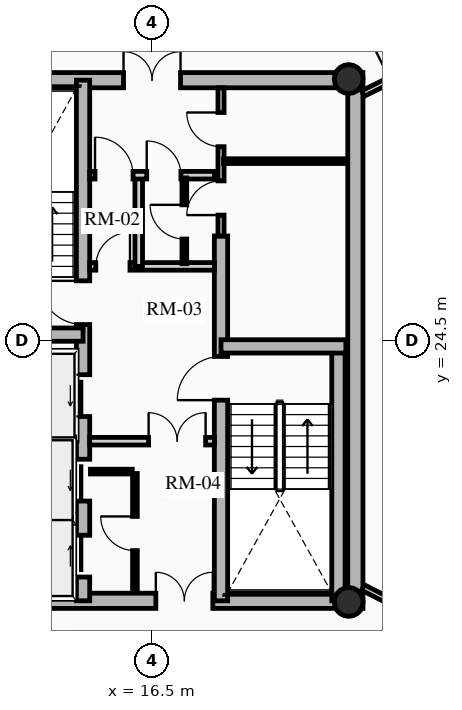
"""IFC4 building model, lengths in metres.
Left out: names, types, materials, properties, quantities, classifications, styles, units other than length and angle.
Written with IfcOpenShell. Run it as: python <this file> out.ifc"""

import sys

from ifc_helpers import new_model, si_unit, direction, frame, frame_2d, origin, origin_2d, place, context, subcontext, project, spatial, rectangle, hollow_circle, extrude, source, transform, mapped, element, fill, save


model = new_model("IFC4")
c1 = context("Model", 3, precision=1e-05, world=origin(), true_north=direction((0.0, 1.0)))
c2 = subcontext(c1, "Body", "Model", "MODEL_VIEW")
j1 = project(units=[si_unit("LENGTHUNIT", "METRE"), si_unit("PLANEANGLEUNIT", "RADIAN")], contexts=[c1])
p1 = place(None, origin())
s1 = spatial("IfcSite", under=j1, at=p1, CompositionType="ELEMENT")
p2 = place(p1, origin())
s2 = spatial("IfcBuilding", under=s1, at=p2, CompositionType="ELEMENT")
p3 = place(p2, frame((0.0, 0.0, 183.61)))
s3 = spatial("IfcBuildingStorey", under=s2, at=p3, CompositionType="ELEMENT", Elevation=183.61)
p4 = place(p3, frame((21.85, 17.45, 0.0), z_axis=(0.0, 0.0, 1.0), x_axis=(0.0, 1.0, 0.0)))
e1 = element("IfcWall", 1, at=p4, inside=s3, PredefinedType="SHEAR", context=c2, shape_type="SweptSolid", body=[
    extrude(rectangle(XDim=14.1, YDim=0.4, at=frame_2d((7.05, 0.0))), origin(), (0.0, 0.0, 1.0), 2.91),
])
p5 = place(p3, frame((11.15, 17.65, 0.0), z_axis=(0.0, 0.0, 1.0), x_axis=(1.0, 0.0, 0.0)))
e2 = element("IfcWall", 2, at=p5, inside=s3, PredefinedType="SHEAR", context=c2, shape_type="SweptSolid", body=[
    extrude(rectangle(XDim=10.7, YDim=0.4, at=frame_2d((5.35, 0.0))), origin(), (0.0, 0.0, 1.0), 2.91),
])
m1 = source(origin(), c2, "Body", "SweptSolid", [
    extrude(rectangle(XDim=1.5, YDim=2.02, at=frame_2d((0.75, 1.01))), frame((0.0, 0.21, 0.0), z_axis=(0.0, -1.0, 0.0), x_axis=(1.0, 0.0, 0.0)), (0.0, 0.0, 1.0), 0.42),
])
p6 = place(p5, frame((5.45, 0.0, 0.0)))
e3 = element("IfcOpeningElement", 3, at=p6, cuts=e2, PredefinedType="OPENING", context=c2, shape_type="MappedRepresentation", body=[
    mapped(m1, transform((0.0, 0.0, 0.0), x_axis=(1.0, 0.0, 0.0), y_axis=(0.0, 1.0, 0.0), z_axis=(0.0, 0.0, 1.0), scale=1.0)),
])
p7 = place(p3, frame((11.15, 31.35, 0.0), z_axis=(0.0, 0.0, 1.0), x_axis=(1.0, 0.0, 0.0)))
e4 = element("IfcWall", 4, at=p7, inside=s3, PredefinedType="SHEAR", context=c2, shape_type="SweptSolid", body=[
    extrude(rectangle(XDim=10.7, YDim=0.4, at=frame_2d((5.35, 0.0))), origin(), (0.0, 0.0, 1.0), 2.91),
])
p8 = place(p7, frame((4.6, 0.0, 0.0)))
e5 = element("IfcOpeningElement", 5, at=p8, cuts=e4, PredefinedType="OPENING", context=c2, shape_type="MappedRepresentation", body=[
    mapped(m1, transform((0.0, 0.0, 0.0), x_axis=(1.0, 0.0, 0.0), y_axis=(0.0, 1.0, 0.0), z_axis=(0.0, 0.0, 1.0), scale=1.0)),
])
p9 = place(p3, frame((14.685, 17.65, 0.0), z_axis=(0.0, 0.0, 1.0), x_axis=(0.0, 1.0, 0.0)))
e6 = element("IfcWall", 6, at=p9, inside=s3, PredefinedType="SHEAR", context=c2, shape_type="SweptSolid", body=[
    extrude(rectangle(XDim=13.7, YDim=0.35, at=frame_2d((6.85, 0.0))), origin(), (0.0, 0.0, 1.0), 2.91),
])
m2 = source(origin(), c2, "Body", "SweptSolid", [
    extrude(rectangle(XDim=1.1, YDim=2.015, at=frame_2d((0.55, 1.007))), frame((0.0, 0.185, 0.0), z_axis=(0.0, -1.0, 0.0), x_axis=(1.0, 0.0, 0.0)), (0.0, 0.0, 1.0), 0.37),
])
p10 = place(p9, frame((4.85, 0.0, 0.0)))
e7 = element("IfcOpeningElement", 7, at=p10, cuts=e6, PredefinedType="OPENING", context=c2, shape_type="MappedRepresentation", body=[
    mapped(m2, transform((0.0, 0.0, 0.0), x_axis=(1.0, 0.0, 0.0), y_axis=(0.0, 1.0, 0.0), z_axis=(0.0, 0.0, 1.0), scale=1.0)),
])
p11 = place(p9, frame((0.625, 0.0, 0.0)))
e8 = element("IfcOpeningElement", 8, at=p11, cuts=e6, PredefinedType="OPENING", context=c2, shape_type="MappedRepresentation", body=[
    mapped(m2, transform((0.0, 0.0, 0.0), x_axis=(1.0, 0.0, 0.0), y_axis=(0.0, 1.0, 0.0), z_axis=(0.0, 0.0, 1.0), scale=1.0)),
])
p12 = place(p9, frame((2.625, 0.0, 0.0)))
e9 = element("IfcOpeningElement", 9, at=p12, cuts=e6, PredefinedType="OPENING", context=c2, shape_type="MappedRepresentation", body=[
    mapped(m2, transform((0.0, 0.0, 0.0), x_axis=(1.0, 0.0, 0.0), y_axis=(0.0, 1.0, 0.0), z_axis=(0.0, 0.0, 1.0), scale=1.0)),
])
m3 = source(origin(), c2, "Body", "SweptSolid", [
    extrude(rectangle(XDim=1.15, YDim=2.02, at=frame_2d((0.575, 1.01))), frame((0.0, 0.185, 0.0), z_axis=(0.0, -1.0, 0.0), x_axis=(1.0, 0.0, 0.0)), (0.0, 0.0, 1.0), 0.37),
])
p13 = place(p9, frame((7.27, 0.0, 0.0)))
e10 = element("IfcOpeningElement", 10, at=p13, cuts=e6, PredefinedType="OPENING", context=c2, shape_type="MappedRepresentation", body=[
    mapped(m3, transform((0.0, 0.0, 0.0), x_axis=(1.0, 0.0, 0.0), y_axis=(0.0, 1.0, 0.0), z_axis=(0.0, 0.0, 1.0), scale=1.0)),
])
p14 = place(p3, frame((18.315, 17.65, 0.0), z_axis=(0.0, 0.0, 1.0), x_axis=(0.0, 1.0, 0.0)))
e11 = element("IfcWall", 11, at=p14, inside=s3, PredefinedType="SHEAR", context=c2, shape_type="SweptSolid", body=[
    extrude(rectangle(XDim=9.6, YDim=0.35, at=frame_2d((4.8, 0.0))), origin(), (0.0, 0.0, 1.0), 2.91),
])
p15 = place(p14, frame((5.28, 0.0, 0.0)))
e12 = element("IfcOpeningElement", 12, at=p15, cuts=e11, PredefinedType="OPENING", context=c2, shape_type="MappedRepresentation", body=[
    mapped(m3, transform((0.0, 0.0, 0.0), x_axis=(1.0, 0.0, 0.0), y_axis=(0.0, 1.0, 0.0), z_axis=(0.0, 0.0, 1.0), scale=1.0)),
])
p16 = place(p3, frame((11.4, 24.655, 0.0), z_axis=(0.0, 0.0, 1.0), x_axis=(1.0, 0.0, 0.0)))
e13 = element("IfcWall", 13, at=p16, inside=s3, PredefinedType="SHEAR", context=c2, shape_type="SweptSolid", body=[
    extrude(rectangle(XDim=3.285, YDim=0.35, at=frame_2d((1.643, 0.0))), origin(), (0.0, 0.0, 1.0), 2.91),
])
p17 = place(p3, frame((21.405, 17.65, 0.0), z_axis=(0.0, 0.0, 1.0), x_axis=(0.0, 1.0, 0.0)))
e14 = element("IfcWall", 14, at=p17, inside=s3, PredefinedType="SHEAR", context=c2, shape_type="SweptSolid", body=[
    extrude(rectangle(XDim=6.695, YDim=0.35, at=frame_2d((3.348, 0.0))), origin(), (0.0, 0.0, 1.0), 2.91),
])
p18 = place(p3, frame((18.315, 24.345, 0.0), z_axis=(0.0, 0.0, 1.0), x_axis=(1.0, 0.0, 0.0)))
e15 = element("IfcWall", 15, at=p18, inside=s3, PredefinedType="SHEAR", context=c2, shape_type="SweptSolid", body=[
    extrude(rectangle(XDim=3.285, YDim=0.35, at=frame_2d((1.643, 0.0))), origin(), (0.0, 0.0, 1.0), 2.91),
])
for number, where, z_axis, x_axis in (
    (16, (21.675, 17.62, 0.0), (0.0, 0.0, 1.0), (1.0, 0.0, 0.0)),
    (17, (21.675, 31.38, 0.0), (0.0, 0.0, 1.0), (1.0, 0.0, 0.0)),
):
    element("IfcColumn", number, at=place(p3, frame(where, z_axis=z_axis, x_axis=x_axis)), inside=s3, PredefinedType="COLUMN", context=c2, shape_type="SweptSolid", body=[
        extrude(hollow_circle(Radius=0.38, WallThickness=0.032, at=origin_2d()), origin(), (0.0, 0.0, 1.0), 2.91),
    ])
for number, where, z_axis, x_axis in (
    (18, (11.52, 21.8, 0.0), (0.0, 0.0, 1.0), (1.0, 0.0, 0.0)),
    (19, (11.52, 19.825, 0.0), (0.0, 0.0, 1.0), (1.0, 0.0, 0.0)),
):
    element("IfcWall", number, at=place(p3, frame(where, z_axis=z_axis, x_axis=x_axis)), inside=s3, PredefinedType="SHEAR", context=c2, shape_type="SweptSolid", body=[
        extrude(rectangle(XDim=2.97, YDim=0.2, at=frame_2d((1.485, 0.0))), origin(), (0.0, 0.0, 1.0), 2.91),
    ])
p19 = place(p3, frame((14.86, 21.85, 0.0), z_axis=(0.0, 0.0, 1.0), x_axis=(1.0, 0.0, 0.0)))
e20 = element("IfcWall", 20, at=p19, inside=s3, PredefinedType="PARTITIONING", context=c2, shape_type="SweptSolid", body=[
    extrude(rectangle(XDim=3.28, YDim=0.2, at=frame_2d((1.64, 0.0))), origin(), (0.0, 0.0, 1.0), 2.675),
])
m4 = source(origin(), c2, "Body", "SweptSolid", [
    extrude(rectangle(XDim=1.5, YDim=2.02, at=frame_2d((0.75, 1.01))), frame((0.0, 0.11, 0.0), z_axis=(0.0, -1.0, 0.0), x_axis=(1.0, 0.0, 0.0)), (0.0, 0.0, 1.0), 0.22),
])
p20 = place(p19, frame((1.55, 0.0, 0.0)))
e21 = element("IfcOpeningElement", 21, at=p20, cuts=e20, PredefinedType="OPENING", context=c2, shape_type="MappedRepresentation", body=[
    mapped(m4, transform((0.0, 0.0, 0.0), x_axis=(1.0, 0.0, 0.0), y_axis=(0.0, 1.0, 0.0), z_axis=(0.0, 0.0, 1.0), scale=1.0)),
])
p21 = place(p3, frame((14.86, 26.45, 0.0), z_axis=(0.0, 0.0, 1.0), x_axis=(1.0, 0.0, 0.0)))
e22 = element("IfcWall", 22, at=p21, inside=s3, PredefinedType="PARTITIONING", context=c2, shape_type="SweptSolid", body=[
    extrude(rectangle(XDim=3.28, YDim=0.2, at=frame_2d((1.64, 0.0))), origin(), (0.0, 0.0, 1.0), 2.675),
])
m5 = source(origin(), c2, "Body", "SweptSolid", [
    extrude(rectangle(XDim=0.9, YDim=2.005, at=frame_2d((0.45, 1.002))), frame((0.0, 0.11, 0.0), z_axis=(0.0, -1.0, 0.0), x_axis=(1.0, 0.0, 0.0)), (0.0, 0.0, 1.0), 0.22),
])
p22 = place(p21, frame((0.16, 0.0, 0.0)))
e23 = element("IfcOpeningElement", 23, at=p22, cuts=e22, PredefinedType="OPENING", context=c2, shape_type="MappedRepresentation", body=[
    mapped(m5, transform((0.0, 0.0, 0.0), x_axis=(1.0, 0.0, 0.0), y_axis=(0.0, 1.0, 0.0), z_axis=(0.0, 0.0, 1.0), scale=1.0)),
])
p23 = place(p3, frame((16.15, 26.45, 0.0), z_axis=(0.0, 0.0, 1.0), x_axis=(0.0, 1.0, 0.0)))
e24 = element("IfcWall", 24, at=p23, inside=s3, PredefinedType="PARTITIONING", context=c2, shape_type="SweptSolid", body=[
    extrude(rectangle(XDim=2.4, YDim=0.2, at=frame_2d((1.2, 0.0))), origin(), (0.0, 0.0, 1.0), 2.675),
])
p24 = place(p3, frame((14.86, 28.85, 0.0), z_axis=(0.0, 0.0, 1.0), x_axis=(1.0, 0.0, 0.0)))
e25 = element("IfcWall", 25, at=p24, inside=s3, PredefinedType="PARTITIONING", context=c2, shape_type="SweptSolid", body=[
    extrude(rectangle(XDim=3.28, YDim=0.2, at=frame_2d((1.64, 0.0))), origin(), (0.0, 0.0, 1.0), 2.675),
])
m6 = source(origin(), c2, "Body", "SweptSolid", [
    extrude(rectangle(XDim=1.0, YDim=2.015, at=frame_2d((0.5, 1.007))), frame((0.0, 0.11, 0.0), z_axis=(0.0, -1.0, 0.0), x_axis=(1.0, 0.0, 0.0)), (0.0, 0.0, 1.0), 0.22),
])
p25 = place(p24, frame((0.14, 0.0, 0.0)))
e26 = element("IfcOpeningElement", 26, at=p25, cuts=e25, PredefinedType="OPENING", context=c2, shape_type="MappedRepresentation", body=[
    mapped(m6, transform((0.0, 0.0, 0.0), x_axis=(1.0, 0.0, 0.0), y_axis=(0.0, 1.0, 0.0), z_axis=(0.0, 0.0, 1.0), scale=1.0)),
])
p26 = place(p24, frame((1.5, 0.0, 0.0)))
e27 = element("IfcOpeningElement", 27, at=p26, cuts=e25, PredefinedType="OPENING", context=c2, shape_type="MappedRepresentation", body=[
    mapped(m5, transform((0.0, 0.0, 0.0), x_axis=(1.0, 0.0, 0.0), y_axis=(0.0, 1.0, 0.0), z_axis=(0.0, 0.0, 1.0), scale=1.0)),
])
p27 = place(p3, frame((16.05, 17.92, 0.0), z_axis=(0.0, 0.0, 1.0), x_axis=(0.0, 1.0, 0.0)))
e28 = element("IfcWall", 28, at=p27, inside=s3, PredefinedType="PARTITIONING", context=c2, shape_type="SweptSolid", body=[
    extrude(rectangle(XDim=3.08, YDim=0.125, at=frame_2d((1.54, 0.0))), origin(), (0.0, 0.0, 1.0), 2.675),
])
m7 = source(origin(), c2, "Body", "SweptSolid", [
    extrude(rectangle(XDim=0.9, YDim=2.005, at=frame_2d((0.45, 1.002))), frame((0.0, 0.073, 0.0), z_axis=(0.0, -1.0, 0.0), x_axis=(1.0, 0.0, 0.0)), (0.0, 0.0, 1.0), 0.145),
])
p28 = place(p27, frame((1.05, 0.0, 0.0)))
e29 = element("IfcOpeningElement", 29, at=p28, cuts=e28, PredefinedType="OPENING", context=c2, shape_type="MappedRepresentation", body=[
    mapped(m7, transform((0.0, 0.0, 0.0), x_axis=(1.0, 0.0, 0.0), y_axis=(0.0, 1.0, 0.0), z_axis=(0.0, 0.0, 1.0), scale=1.0)),
])
p29 = place(p3, frame((14.88, 21.05, 0.0), z_axis=(0.0, 0.0, 1.0), x_axis=(1.0, 0.0, 0.0)))
e30 = element("IfcWall", 30, at=p29, inside=s3, PredefinedType="PARTITIONING", context=c2, shape_type="SweptSolid", body=[
    extrude(rectangle(XDim=1.1, YDim=0.125, at=frame_2d((0.55, 0.0))), origin(), (0.0, 0.0, 1.0), 2.675),
])
p30 = place(p3, frame((17.35, 26.52, 0.0), z_axis=(0.0, 0.0, 1.0), x_axis=(0.0, 1.0, 0.0)))
e31 = element("IfcWall", 31, at=p30, inside=s3, PredefinedType="PARTITIONING", context=c2, shape_type="SweptSolid", body=[
    extrude(rectangle(XDim=2.26, YDim=0.125, at=frame_2d((1.13, 0.0))), origin(), (0.0, 0.0, 1.0), 2.675),
])
p31 = place(p30, frame((0.65, 0.0, 0.0)))
e32 = element("IfcOpeningElement", 32, at=p31, cuts=e31, PredefinedType="OPENING", context=c2, shape_type="MappedRepresentation", body=[
    mapped(m7, transform((0.0, 0.0, 0.0), x_axis=(1.0, 0.0, 0.0), y_axis=(0.0, 1.0, 0.0), z_axis=(0.0, 0.0, 1.0), scale=1.0)),
])
p32 = place(p3, frame((18.315, 27.25, 0.0), z_axis=(0.0, 0.0, 1.0), x_axis=(0.0, 1.0, 0.0)))
e33 = element("IfcWall", 33, at=p32, inside=s3, PredefinedType="PARTITIONING", context=c2, shape_type="SweptSolid", body=[
    extrude(rectangle(XDim=3.9, YDim=0.16, at=frame_2d((1.95, 0.0))), origin(), (0.0, 0.0, 1.0), 2.675),
])
m8 = source(origin(), c2, "Body", "SweptSolid", [
    extrude(rectangle(XDim=0.9, YDim=2.005, at=frame_2d((0.45, 1.002))), frame((0.0, 0.09, 0.0), z_axis=(0.0, -1.0, 0.0), x_axis=(1.0, 0.0, 0.0)), (0.0, 0.0, 1.0), 0.18),
])
p33 = place(p32, frame((0.55, 0.0, 0.0)))
e34 = element("IfcOpeningElement", 34, at=p33, cuts=e33, PredefinedType="OPENING", context=c2, shape_type="MappedRepresentation", body=[
    mapped(m8, transform((0.0, 0.0, 0.0), x_axis=(1.0, 0.0, 0.0), y_axis=(0.0, 1.0, 0.0), z_axis=(0.0, 0.0, 1.0), scale=1.0)),
])
p34 = place(p32, frame((2.35, 0.0, 0.0)))
e35 = element("IfcOpeningElement", 35, at=p34, cuts=e33, PredefinedType="OPENING", context=c2, shape_type="MappedRepresentation", body=[
    mapped(m8, transform((0.0, 0.0, 0.0), x_axis=(1.0, 0.0, 0.0), y_axis=(0.0, 1.0, 0.0), z_axis=(0.0, 0.0, 1.0), scale=1.0)),
])
p35 = place(p3, frame((18.38, 29.22, 0.0), z_axis=(0.0, 0.0, 1.0), x_axis=(1.0, 0.0, 0.0)))
e36 = element("IfcWall", 36, at=p35, inside=s3, PredefinedType="PARTITIONING", context=c2, shape_type="SweptSolid", body=[
    extrude(rectangle(XDim=3.22, YDim=0.125, at=frame_2d((1.61, 0.0))), origin(), (0.0, 0.0, 1.0), 2.212),
])
p36 = place(p3, frame((22.05, 31.0, 0.0), z_axis=(0.0, 0.0, 1.0), x_axis=(0.896798317999, 0.442439574218, 0.0)))
e37 = element("IfcWall", 37, at=p36, inside=s3, PredefinedType="PARTITIONING", context=c2, shape_type="SweptSolid", body=[
    extrude(rectangle(XDim=2.048, YDim=0.16, at=frame_2d((1.024, 0.0))), origin(), (0.0, 0.0, 1.0), 2.245),
])
m9 = source(origin(), c2, "Body", "SweptSolid", [
    extrude(rectangle(XDim=1.05, YDim=2.015, at=frame_2d((0.525, 1.007))), frame((0.0, 0.09, 0.0), z_axis=(0.0, -1.0, 0.0), x_axis=(1.0, 0.0, 0.0)), (0.0, 0.0, 1.0), 0.18),
])
p37 = place(p36, frame((0.798, 0.0, 0.0)))
e38 = element("IfcOpeningElement", 38, at=p37, cuts=e37, PredefinedType="OPENING", context=c2, shape_type="MappedRepresentation", body=[
    mapped(m9, transform((0.0, 0.0, 0.0), x_axis=(1.0, 0.0, 0.0), y_axis=(0.0, 1.0, 0.0), z_axis=(0.0, 0.0, 1.0), scale=1.0)),
])
p38 = place(p3, frame((22.05, 18.0, 0.0), z_axis=(0.0, 0.0, 1.0), x_axis=(0.890660222535, -0.454669515136, 0.0)))
e39 = element("IfcWall", 39, at=p38, inside=s3, PredefinedType="PARTITIONING", context=c2, shape_type="SweptSolid", body=[
    extrude(rectangle(XDim=2.144, YDim=0.16, at=frame_2d((1.072, 0.0))), origin(), (0.0, 0.0, 1.0), 2.245),
])
p39 = place(p38, frame((0.894, 0.0, 0.0)))
e40 = element("IfcOpeningElement", 40, at=p39, cuts=e39, PredefinedType="OPENING", context=c2, shape_type="MappedRepresentation", body=[
    mapped(m9, transform((0.0, 0.0, 0.0), x_axis=(1.0, 0.0, 0.0), y_axis=(0.0, 1.0, 0.0), z_axis=(0.0, 0.0, 1.0), scale=1.0)),
])
m10 = source(origin(), c2, "Body", "SweptSolid", [
    extrude(rectangle(XDim=1.1, YDim=2.015, at=frame_2d((0.55, 1.007))), frame((0.0, 0.025, 0.0), z_axis=(0.0, -1.0, 0.0), x_axis=(1.0, 0.0, 0.0)), (0.0, 0.0, 1.0), 0.05),
])
p40 = place(p10, origin())
e41 = element("IfcDoor", 41, at=p40, inside=s3, OperationType="SLIDING_TO_LEFT", PredefinedType="DOOR", context=c2, shape_type="MappedRepresentation", body=[
    mapped(m10, transform((0.0, 0.0, 0.0), x_axis=(1.0, 0.0, 0.0), y_axis=(0.0, 1.0, 0.0), z_axis=(0.0, 0.0, 1.0), scale=1.0)),
])
fill(e7, e41)
p41 = place(p11, origin())
e42 = element("IfcDoor", 42, at=p41, inside=s3, OperationType="SLIDING_TO_RIGHT", PredefinedType="DOOR", context=c2, shape_type="MappedRepresentation", body=[
    mapped(m10, transform((0.0, 0.0, 0.0), x_axis=(1.0, 0.0, 0.0), y_axis=(0.0, 1.0, 0.0), z_axis=(0.0, 0.0, 1.0), scale=1.0)),
])
fill(e8, e42)
p42 = place(p12, origin())
e43 = element("IfcDoor", 43, at=p42, inside=s3, OperationType="SLIDING_TO_LEFT", PredefinedType="DOOR", context=c2, shape_type="MappedRepresentation", body=[
    mapped(m10, transform((0.0, 0.0, 0.0), x_axis=(1.0, 0.0, 0.0), y_axis=(0.0, 1.0, 0.0), z_axis=(0.0, 0.0, 1.0), scale=1.0)),
])
fill(e9, e43)
m11 = source(origin(), c2, "Body", "SweptSolid", [
    extrude(rectangle(XDim=1.15, YDim=2.02, at=frame_2d((0.575, 1.01))), frame((0.0, 0.025, 0.0), z_axis=(0.0, -1.0, 0.0), x_axis=(1.0, 0.0, 0.0)), (0.0, 0.0, 1.0), 0.05),
])
p43 = place(p13, origin())
e44 = element("IfcDoor", 44, at=p43, inside=s3, OperationType="SINGLE_SWING_RIGHT", PredefinedType="DOOR", context=c2, shape_type="MappedRepresentation", body=[
    mapped(m11, transform((0.0, 0.0, 0.0), x_axis=(1.0, 0.0, 0.0), y_axis=(0.0, 1.0, 0.0), z_axis=(0.0, 0.0, 1.0), scale=1.0)),
])
fill(e10, e44)
p44 = place(p15, origin())
e45 = element("IfcDoor", 45, at=p44, inside=s3, OperationType="SINGLE_SWING_LEFT", PredefinedType="DOOR", context=c2, shape_type="MappedRepresentation", body=[
    mapped(m11, transform((0.0, 0.0, 0.0), x_axis=(1.0, 0.0, 0.0), y_axis=(0.0, 1.0, 0.0), z_axis=(0.0, 0.0, 1.0), scale=1.0)),
])
fill(e12, e45)
m12 = source(origin(), c2, "Body", "SweptSolid", [
    extrude(rectangle(XDim=1.5, YDim=2.02, at=frame_2d((0.75, 1.01))), frame((0.0, 0.025, 0.0), z_axis=(0.0, -1.0, 0.0), x_axis=(1.0, 0.0, 0.0)), (0.0, 0.0, 1.0), 0.05),
])
p45 = place(p8, origin())
e46 = element("IfcDoor", 46, at=p45, inside=s3, OperationType="DOUBLE_DOOR_SINGLE_SWING", PredefinedType="DOOR", context=c2, shape_type="MappedRepresentation", body=[
    mapped(m12, transform((0.0, 0.0, 0.0), x_axis=(1.0, 0.0, 0.0), y_axis=(0.0, 1.0, 0.0), z_axis=(0.0, 0.0, 1.0), scale=1.0)),
])
fill(e5, e46)
p46 = place(p6, origin())
e47 = element("IfcDoor", 47, at=p46, inside=s3, OperationType="DOUBLE_DOOR_SINGLE_SWING", PredefinedType="DOOR", context=c2, shape_type="MappedRepresentation", body=[
    mapped(m12, transform((0.0, 0.0, 0.0), x_axis=(1.0, 0.0, 0.0), y_axis=(0.0, 1.0, 0.0), z_axis=(0.0, 0.0, 1.0), scale=1.0)),
])
fill(e3, e47)
p47 = place(p20, origin())
e48 = element("IfcDoor", 48, at=p47, inside=s3, OperationType="DOUBLE_DOOR_SINGLE_SWING", PredefinedType="DOOR", context=c2, shape_type="MappedRepresentation", body=[
    mapped(m12, transform((0.0, 0.0, 0.0), x_axis=(1.0, 0.0, 0.0), y_axis=(0.0, 1.0, 0.0), z_axis=(0.0, 0.0, 1.0), scale=1.0)),
])
fill(e21, e48)
m13 = source(origin(), c2, "Body", "SweptSolid", [
    extrude(rectangle(XDim=0.9, YDim=2.005, at=frame_2d((0.45, 1.002))), frame((0.0, 0.025, 0.0), z_axis=(0.0, -1.0, 0.0), x_axis=(1.0, 0.0, 0.0)), (0.0, 0.0, 1.0), 0.05),
])
p48 = place(p22, origin())
e49 = element("IfcDoor", 49, at=p48, inside=s3, OperationType="SINGLE_SWING_RIGHT", PredefinedType="DOOR", context=c2, shape_type="MappedRepresentation", body=[
    mapped(m13, transform((0.0, 0.0, 0.0), x_axis=(1.0, 0.0, 0.0), y_axis=(0.0, 1.0, 0.0), z_axis=(0.0, 0.0, 1.0), scale=1.0)),
])
fill(e23, e49)
m14 = source(origin(), c2, "Body", "SweptSolid", [
    extrude(rectangle(XDim=1.0, YDim=2.015, at=frame_2d((0.5, 1.007))), frame((0.0, 0.025, 0.0), z_axis=(0.0, -1.0, 0.0), x_axis=(1.0, 0.0, 0.0)), (0.0, 0.0, 1.0), 0.05),
])
p49 = place(p25, origin())
e50 = element("IfcDoor", 50, at=p49, inside=s3, OperationType="SINGLE_SWING_LEFT", PredefinedType="DOOR", context=c2, shape_type="MappedRepresentation", body=[
    mapped(m14, transform((0.0, 0.0, 0.0), x_axis=(1.0, 0.0, 0.0), y_axis=(0.0, 1.0, 0.0), z_axis=(0.0, 0.0, 1.0), scale=1.0)),
])
fill(e26, e50)
p50 = place(p28, origin())
e51 = element("IfcDoor", 51, at=p50, inside=s3, OperationType="SINGLE_SWING_RIGHT", PredefinedType="DOOR", context=c2, shape_type="MappedRepresentation", body=[
    mapped(m13, transform((0.0, 0.0, 0.0), x_axis=(1.0, 0.0, 0.0), y_axis=(0.0, 1.0, 0.0), z_axis=(0.0, 0.0, 1.0), scale=1.0)),
])
fill(e29, e51)
p51 = place(p26, origin())
e52 = element("IfcDoor", 52, at=p51, inside=s3, OperationType="SINGLE_SWING_LEFT", PredefinedType="DOOR", context=c2, shape_type="MappedRepresentation", body=[
    mapped(m13, transform((0.0, 0.0, 0.0), x_axis=(1.0, 0.0, 0.0), y_axis=(0.0, 1.0, 0.0), z_axis=(0.0, 0.0, 1.0), scale=1.0)),
])
fill(e27, e52)
p52 = place(p31, origin())
e53 = element("IfcDoor", 53, at=p52, inside=s3, OperationType="SINGLE_SWING_RIGHT", PredefinedType="DOOR", context=c2, shape_type="MappedRepresentation", body=[
    mapped(m13, transform((0.0, 0.0, 0.0), x_axis=(1.0, 0.0, 0.0), y_axis=(0.0, 1.0, 0.0), z_axis=(0.0, 0.0, 1.0), scale=1.0)),
])
fill(e32, e53)
p53 = place(p33, origin())
e54 = element("IfcDoor", 54, at=p53, inside=s3, OperationType="SINGLE_SWING_LEFT", PredefinedType="DOOR", context=c2, shape_type="MappedRepresentation", body=[
    mapped(m13, transform((0.0, 0.0, 0.0), x_axis=(1.0, 0.0, 0.0), y_axis=(0.0, 1.0, 0.0), z_axis=(0.0, 0.0, 1.0), scale=1.0)),
])
fill(e34, e54)
p54 = place(p34, origin())
e55 = element("IfcDoor", 55, at=p54, inside=s3, OperationType="SINGLE_SWING_RIGHT", PredefinedType="DOOR", context=c2, shape_type="MappedRepresentation", body=[
    mapped(m13, transform((0.0, 0.0, 0.0), x_axis=(1.0, 0.0, 0.0), y_axis=(0.0, 1.0, 0.0), z_axis=(0.0, 0.0, 1.0), scale=1.0)),
])
fill(e35, e55)
save(model, sys.argv[1])
